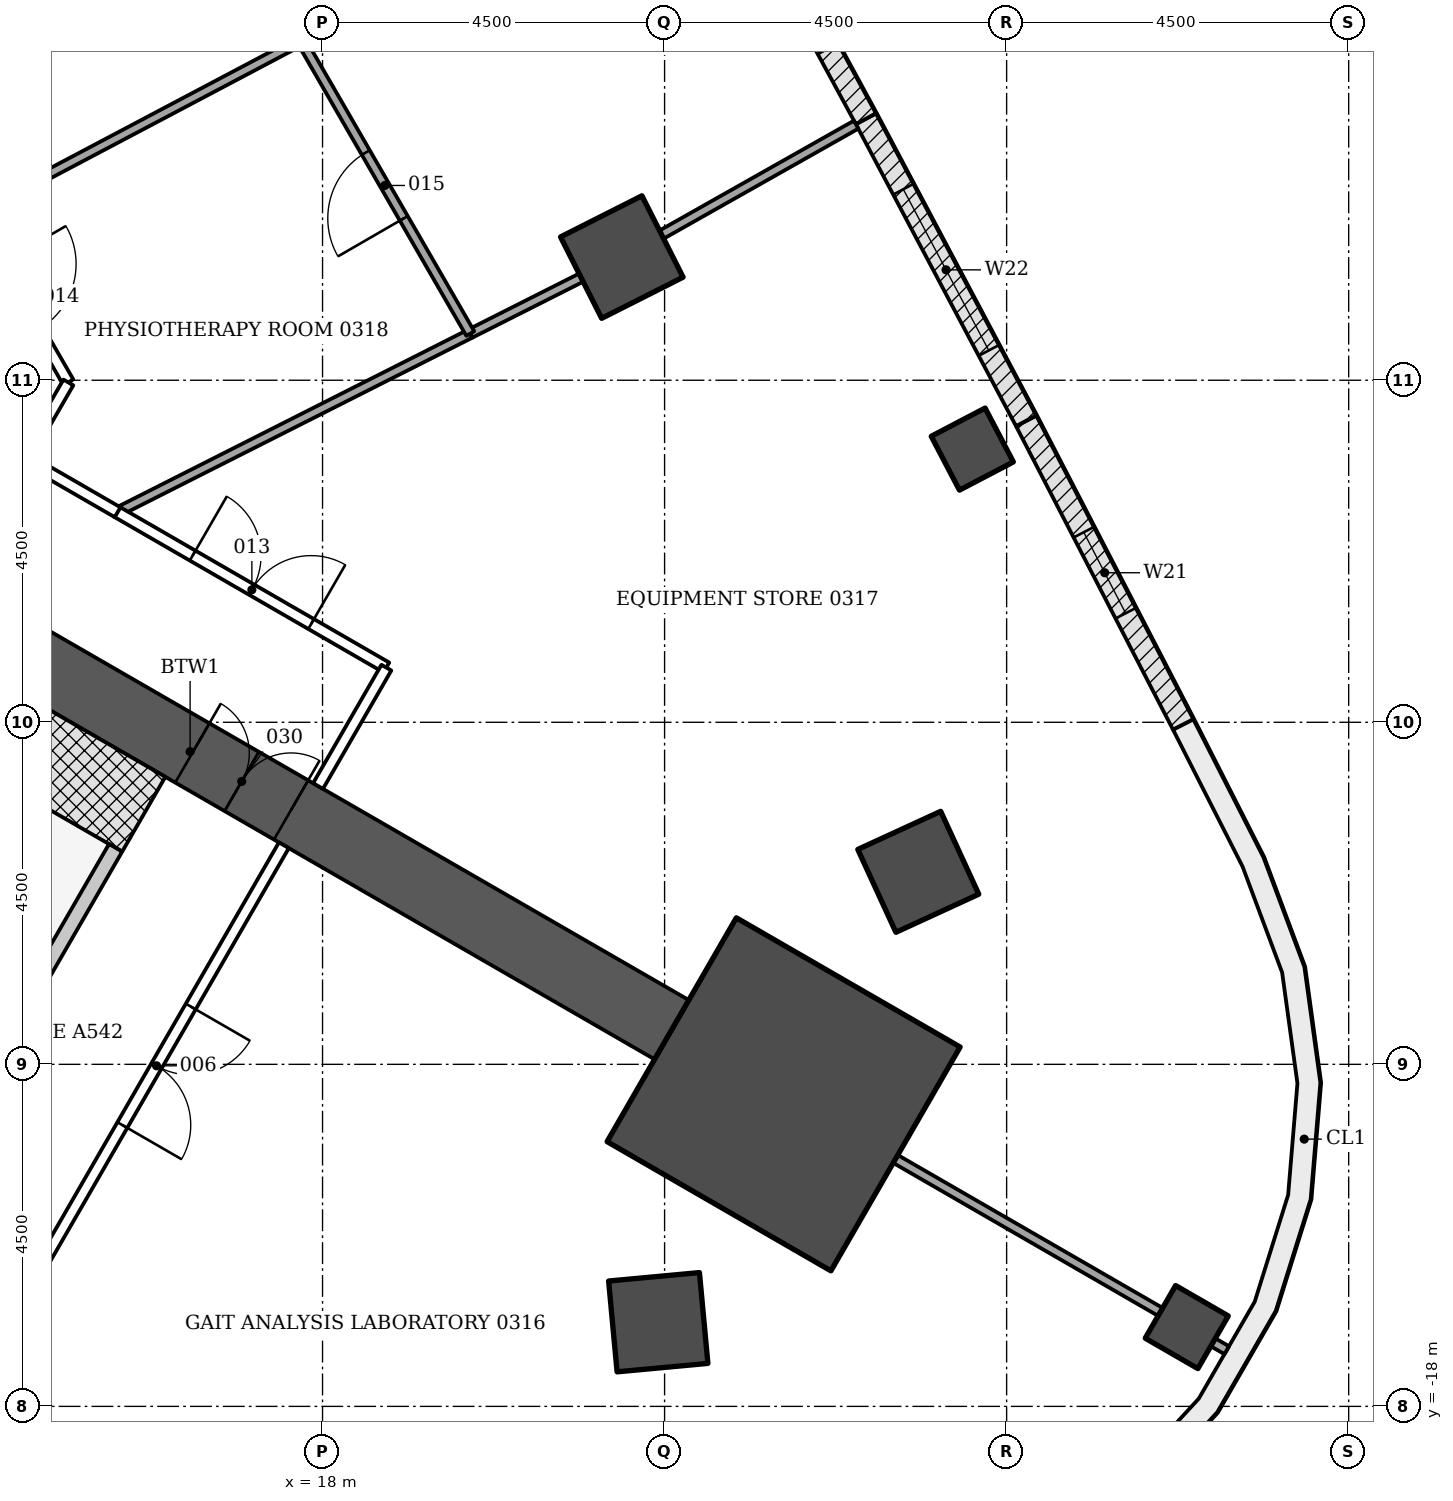
"""IFC4 building model, lengths in metres.
Left out: names, types, materials, properties, quantities, classifications, styles, units other than length and angle.
Written with IfcOpenShell. Run it as: python <this file> out.ifc"""

import sys

from ifc_helpers import new_model, si_unit, direction, frame, frame_2d, origin, origin_2d, place, context, subcontext, project, spatial, polyline, rectangle, outline, extrude, element, fill, save


model = new_model("IFC4")
c1 = context("Model", 3, precision=1e-05, world=origin(), true_north=direction((0.0, 1.0)))
c2 = subcontext(c1, "Body", "Model", "MODEL_VIEW")
j1 = project(units=[si_unit("LENGTHUNIT", "METRE"), si_unit("PLANEANGLEUNIT", "RADIAN")], contexts=[c1])
p1 = place(None, origin())
s1 = spatial("IfcSite", under=j1, at=p1, CompositionType="ELEMENT")
p2 = place(p1, origin())
s2 = spatial("IfcBuilding", under=s1, at=p2, CompositionType="ELEMENT")
p3 = place(p2, frame((0.0, 0.0, 15.0)))
s3 = spatial("IfcBuildingStorey", under=s2, at=p3, CompositionType="ELEMENT", Elevation=15.0)
for number, where, z_axis, x_axis in (
    (1, (22.417, -16.893, -0.25), (0.0, 0.0, 1.0), (0.093, -0.996, 0.0)),
    (2, (25.838, -10.967, -0.25), (0.0, 0.0, 1.0), (0.909, 0.418, 0.0)),
    (3, (21.937, -2.88, -0.25), (0.0, 0.0, 1.0), (0.893, 0.451, 0.0)),
):
    element("IfcColumn", number, at=place(p3, frame(where, z_axis=z_axis, x_axis=x_axis)), inside=s3, PredefinedType="COLUMN", context=c2, shape_type="SweptSolid", body=[
        extrude(rectangle(XDim=1.2, YDim=1.2, at=origin_2d()), origin(), (0.0, 0.0, 1.0), 4.5),
    ])
for number, where, z_axis, x_axis in (
    (4, (29.37, -16.957, -0.25), (0.0, 0.0, 1.0), (0.866, -0.5, 0.0)),
    (5, (26.548, -5.406, -0.25), (0.0, 0.0, 1.0), (0.886, 0.464, 0.0)),
):
    element("IfcColumn", number, at=place(p3, frame(where, z_axis=z_axis, x_axis=x_axis)), inside=s3, PredefinedType="COLUMN", context=c2, shape_type="SweptSolid", body=[
        extrude(rectangle(XDim=0.8, YDim=0.8, at=origin_2d()), origin(), (0.0, 0.0, 1.0), 4.5),
    ])
p4 = place(p3, frame((9.922, -5.728, -0.25), z_axis=(0.0, 0.0, 1.0), x_axis=(0.866028046028, -0.499995423472, 0.0)))
e6 = element("IfcWall", 6, at=p4, inside=s3, PredefinedType="SHEAR", context=c2, shape_type="SweptSolid", body=[
    extrude(rectangle(XDim=14.633, YDim=0.9, at=frame_2d((7.316, 0.0))), origin(), (0.0, 0.0, 1.0), 4.5),
])
p5 = place(p4, frame((7.35, 0.0, 0.25)))
e7 = element("IfcOpeningElement", 7, at=p5, cuts=e6, PredefinedType="OPENING", context=c2, shape_type="SweptSolid", body=[
    extrude(rectangle(XDim=1.5, YDim=2.1, at=frame_2d((0.75, 1.05))), frame((0.0, 0.46, 0.0), z_axis=(0.0, -1.0, 0.0), x_axis=(1.0, 0.0, 0.0)), (0.0, 0.0, 1.0), 0.92),
])
p6 = place(p3, frame((24.066, -13.895, -0.25), z_axis=(0.0, 0.0, 1.0), x_axis=(0.866025403784, -0.5, 0.0)))
e8 = element("IfcColumn", 8, at=p6, inside=s3, PredefinedType="COLUMN", context=c2, shape_type="SweptSolid", body=[
    extrude(rectangle(XDim=3.4, YDim=3.4, at=origin_2d()), origin(), (0.0, 0.0, 1.0), 4.5),
])
p7 = place(p3, frame((27.258, -5.036, 0.0), z_axis=(0.0, 0.0, 1.0), x_axis=(0.459443600121, -0.888206945654, 0.0)))
e9 = element("IfcWall", 9, at=p7, inside=s3, PredefinedType="NOTDEFINED", context=c2, shape_type="SweptSolid", body=[
    extrude(rectangle(XDim=4.496, YDim=0.3, at=frame_2d((2.248, 0.0))), origin(), (0.0, 0.0, 1.0), 4.25),
])
p8 = place(p7, frame((1.648, 0.0, 0.8)))
e10 = element("IfcOpeningElement", 10, at=p8, cuts=e9, PredefinedType="OPENING", context=c2, shape_type="SweptSolid", body=[
    extrude(rectangle(XDim=1.2, YDim=3.0, at=frame_2d((0.6, 1.5))), frame((0.0, 0.16, 0.0), z_axis=(0.0, -1.0, 0.0), x_axis=(1.0, 0.0, 0.0)), (0.0, 0.0, 1.0), 0.32),
])
p9 = place(p3, frame((25.15, -1.062, 0.0), z_axis=(0.0, 0.0, 1.0), x_axis=(0.468566202388, -0.883428386447, 0.0)))
e11 = element("IfcWall", 11, at=p9, inside=s3, PredefinedType="NOTDEFINED", context=c2, shape_type="SweptSolid", body=[
    extrude(rectangle(XDim=4.496, YDim=0.3, at=frame_2d((2.248, 0.0))), origin(), (0.0, 0.0, 1.0), 4.25),
])
p10 = place(p9, frame((1.048, 0.0, 0.9)))
e12 = element("IfcOpeningElement", 12, at=p10, cuts=e11, PredefinedType="OPENING", context=c2, shape_type="SweptSolid", body=[
    extrude(rectangle(XDim=2.4, YDim=2.4, at=frame_2d((1.2, 1.2))), frame((0.0, 0.16, 0.0), z_axis=(0.0, -1.0, 0.0), x_axis=(1.0, 0.0, 0.0)), (0.0, 0.0, 1.0), 0.32),
])
p11 = place(p3, frame((23.001, 2.89, 0.0), z_axis=(0.0, 0.0, 1.0), x_axis=(0.477577109439, -0.878589838628, 0.0)))
e13 = element("IfcWall", 13, at=p11, inside=s3, PredefinedType="NOTDEFINED", context=c2, shape_type="SweptSolid", body=[
    extrude(rectangle(XDim=4.496, YDim=0.3, at=frame_2d((2.248, 0.0))), origin(), (0.0, 0.0, 1.0), 4.25),
])
p12 = place(p11, frame((1.048, 0.0, 0.9)))
e14 = element("IfcOpeningElement", 14, at=p12, cuts=e13, PredefinedType="OPENING", context=c2, shape_type="SweptSolid", body=[
    extrude(rectangle(XDim=2.4, YDim=2.4, at=frame_2d((1.2, 1.2))), frame((0.0, 0.16, 0.0), z_axis=(0.0, -1.0, 0.0), x_axis=(1.0, 0.0, 0.0)), (0.0, 0.0, 1.0), 0.32),
])
p13 = place(p3, origin())
e15 = element("IfcWall", 15, at=p13, inside=s3, PredefinedType="NOTDEFINED", context=c2, shape_type="SweptSolid", body=[
    extrude(outline(polyline([(22.49, -21.03), (24.522, -20.921), (26.04, -20.666), (27.465, -20.086), (28.729, -19.209), (29.771, -18.077), (30.54, -16.744), (31.0, -15.276), (31.128, -13.742), (30.917, -12.218), (30.379, -10.776), (29.457, -8.962), (29.19, -9.098), (30.104, -10.897), (30.625, -12.292), (30.826, -13.75), (30.704, -15.218), (30.264, -16.623), (29.528, -17.898), (28.531, -18.981), (27.321, -19.821), (25.957, -20.376), (24.489, -20.622), (22.474, -20.73), (22.49, -21.03)])), origin(), (0.0, 0.0, 1.0), 4.25),
])
p14 = place(p3, frame((9.413, -6.61, -0.25), z_axis=(0.0, 0.0, 1.0), x_axis=(0.866018442252, -0.500012057535, 0.0)))
e16 = element("IfcWall", 16, at=p14, inside=s3, PredefinedType="SHEAR", context=c2, shape_type="SweptSolid", body=[
    extrude(rectangle(XDim=7.2, YDim=1.136, at=frame_2d((3.6, 0.0))), origin(), (0.0, 0.0, 1.0), 4.5),
])
p15 = place(p3, frame((0.0, 0.0, -0.25)))
e17 = element("IfcWall", 17, at=p15, inside=s3, PredefinedType="SHEAR", context=c2, shape_type="SweptSolid", body=[
    extrude(outline(polyline([(12.104, -13.149), (14.289, -12.563), (15.364, -10.701), (15.191, -10.601), (14.157, -12.392), (12.132, -12.934), (12.204, -12.976), (12.204, -12.976), (12.204, -12.976), (12.204, -12.976), (12.204, -12.976), (12.204, -12.976), (12.204, -12.976), (12.204, -12.976), (12.204, -12.976), (12.204, -12.976), (12.204, -12.976), (12.204, -12.976), (12.204, -12.976), (12.204, -12.976), (12.204, -12.976), (12.204, -12.976), (12.204, -12.976), (12.104, -13.149)])), origin(), (0.0, 0.0, 1.0), 4.5),
])
p16 = place(p3, frame((17.491, -10.618, 0.0), z_axis=(0.0, 0.0, 1.0), x_axis=(-0.499969057507, -0.866043267704, 0.0)))
e18 = element("IfcWall", 18, at=p16, inside=s3, PredefinedType="PARTITIONING", context=c2, shape_type="SweptSolid", body=[
    extrude(rectangle(XDim=6.685, YDim=0.15, at=frame_2d((3.342, 0.0))), origin(), (0.0, 0.0, 1.0), 3.638),
])
p17 = place(p16, frame((2.45, 0.0, 0.0)))
e19 = element("IfcOpeningElement", 19, at=p17, cuts=e18, PredefinedType="OPENING", context=c2, shape_type="SweptSolid", body=[
    extrude(rectangle(XDim=1.8, YDim=2.1, at=frame_2d((0.9, 1.05))), frame((0.0, 0.085, 0.0), z_axis=(0.0, -1.0, 0.0), x_axis=(1.0, 0.0, 0.0)), (0.0, 0.0, 1.0), 0.17),
])
p18 = place(p3, frame((29.023, -16.757, 0.0), z_axis=(0.0, 0.0, 1.0), x_axis=(-0.866027971625, 0.499995552344, 0.0)))
e20 = element("IfcWall", 20, at=p18, inside=s3, PredefinedType="PARTITIONING", context=c2, shape_type="SweptSolid", body=[
    extrude(rectangle(XDim=4.024, YDim=0.12, at=frame_2d((2.012, 0.0))), origin(), (0.0, 0.0, 1.0), 3.717),
])
p19 = place(p3, frame((29.896, -17.261, 0.0), z_axis=(0.0, 0.0, 1.0), x_axis=(-0.865774595023, 0.500434162116, 0.0)))
e21 = element("IfcWall", 21, at=p19, inside=s3, PredefinedType="PARTITIONING", context=c2, shape_type="SweptSolid", body=[
    extrude(rectangle(XDim=0.208, YDim=0.12, at=frame_2d((0.104, 0.0))), origin(), (0.0, 0.0, 1.0), 4.25),
])
p20 = place(p3, frame((19.942, -3.888, 0.0), z_axis=(0.0, 0.0, 1.0), x_axis=(-0.89243804137, -0.451169970539, 0.0)))
e22 = element("IfcWall", 22, at=p20, inside=s3, PredefinedType="PARTITIONING", context=c2, shape_type="SweptSolid", body=[
    extrude(rectangle(XDim=5.202, YDim=0.12, at=frame_2d((2.601, 0.0))), origin(), (0.0, 0.0, 1.0), 3.638),
])
p21 = place(p3, frame((21.401, -3.151, 0.0), z_axis=(0.0, 0.0, 1.0), x_axis=(-0.892653768212, -0.450742997834, 0.0)))
e23 = element("IfcWall", 23, at=p21, inside=s3, PredefinedType="PARTITIONING", context=c2, shape_type="SweptSolid", body=[
    extrude(rectangle(XDim=1.631, YDim=0.12, at=frame_2d((0.815, 0.0))), origin(), (0.0, 0.0, 1.0), 3.638),
])
p22 = place(p3, frame((25.02, -1.138, 0.0), z_axis=(0.0, 0.0, 1.0), x_axis=(-0.870620069476, -0.491955988505, 0.0)))
e24 = element("IfcWall", 24, at=p22, inside=s3, PredefinedType="PARTITIONING", context=c2, shape_type="SweptSolid", body=[
    extrude(rectangle(XDim=2.939, YDim=0.12, at=frame_2d((1.47, 0.0))), origin(), (0.0, 0.0, 1.0), 3.633),
])
p23 = place(p3, frame((15.295, -6.232, 0.0), z_axis=(0.0, 0.0, 1.0), x_axis=(0.865991915229, -0.500057999394, 0.0)))
e25 = element("IfcWall", 25, at=p23, inside=s3, PredefinedType="PARTITIONING", context=c2, shape_type="SweptSolid", body=[
    extrude(rectangle(XDim=4.094, YDim=0.15, at=frame_2d((2.047, 0.0))), origin(), (0.0, 0.0, 1.0), 3.638),
])
p24 = place(p23, frame((1.15, 0.0, 0.0)))
e26 = element("IfcOpeningElement", 26, at=p24, cuts=e25, PredefinedType="OPENING", context=c2, shape_type="SweptSolid", body=[
    extrude(rectangle(XDim=1.8, YDim=2.1, at=frame_2d((0.9, 1.05))), frame((0.0, 0.085, 0.0), z_axis=(0.0, -1.0, 0.0), x_axis=(1.0, 0.0, 0.0)), (0.0, 0.0, 1.0), 0.17),
])
p25 = place(p3, frame((18.84, -8.281, 0.0), z_axis=(0.0, 0.0, 1.0), x_axis=(-0.500126010714, -0.86595263924, 0.0)))
e27 = element("IfcWall", 27, at=p25, inside=s3, PredefinedType="PARTITIONING", context=c2, shape_type="SweptSolid", body=[
    extrude(rectangle(XDim=1.798, YDim=0.15, at=frame_2d((0.899, 0.0))), origin(), (0.0, 0.0, 1.0), 3.638),
])
p26 = place(p3, frame((19.944, -3.886, 0.0), z_axis=(0.0, 0.0, 1.0), x_axis=(-0.500092923031, 0.865971748, 0.0)))
e28 = element("IfcWall", 28, at=p26, inside=s3, PredefinedType="PARTITIONING", context=c2, shape_type="SweptSolid", body=[
    extrude(rectangle(XDim=4.449, YDim=0.12, at=frame_2d((2.225, 0.0))), origin(), (0.0, 0.0, 1.0), 3.638),
])
p27 = place(p26, frame((1.75, 0.0, 0.0)))
e29 = element("IfcOpeningElement", 29, at=p27, cuts=e28, PredefinedType="OPENING", context=c2, shape_type="SweptSolid", body=[
    extrude(rectangle(XDim=1.0, YDim=2.1, at=frame_2d((0.5, 1.05))), frame((0.0, 0.07, 0.0), z_axis=(0.0, -1.0, 0.0), x_axis=(1.0, 0.0, 0.0)), (0.0, 0.0, 1.0), 0.14),
])
p28 = place(p3, frame((17.717, -0.034, 0.0), z_axis=(0.0, 0.0, 1.0), x_axis=(-0.884117284138, -0.467265051003, 0.0)))
e30 = element("IfcWall", 30, at=p28, inside=s3, PredefinedType="PARTITIONING", context=c2, shape_type="SweptSolid", body=[
    extrude(rectangle(XDim=4.901, YDim=0.12, at=frame_2d((2.45, 0.0))), origin(), (0.0, 0.0, 1.0), 3.638),
])
p29 = place(p3, frame((13.383, -2.321, 0.0), z_axis=(0.0, 0.0, 1.0), x_axis=(0.499788837842, -0.866147283993, 0.0)))
e31 = element("IfcWall", 31, at=p29, inside=s3, PredefinedType="PARTITIONING", context=c2, shape_type="SweptSolid", body=[
    extrude(rectangle(XDim=2.547, YDim=0.15, at=frame_2d((1.273, 0.0))), origin(), (0.0, 0.0, 1.0), 3.638),
])
p30 = place(p29, frame((0.75, 0.0, 0.0)))
e32 = element("IfcOpeningElement", 32, at=p30, cuts=e31, PredefinedType="OPENING", context=c2, shape_type="SweptSolid", body=[
    extrude(rectangle(XDim=1.0, YDim=2.1, at=frame_2d((0.5, 1.05))), frame((0.0, 0.085, 0.0), z_axis=(0.0, -1.0, 0.0), x_axis=(1.0, 0.0, 0.0)), (0.0, 0.0, 1.0), 0.17),
])
p31 = place(p3, frame((14.656, -4.529, 0.0), z_axis=(0.0, 0.0, 1.0), x_axis=(-0.500502949238, -0.865734831114, 0.0)))
e33 = element("IfcWall", 33, at=p31, inside=s3, PredefinedType="PARTITIONING", context=c2, shape_type="SweptSolid", body=[
    extrude(rectangle(XDim=1.155, YDim=0.15, at=frame_2d((0.578, 0.0))), origin(), (0.0, 0.0, 1.0), 4.25),
])
p32 = place(p3, frame((14.078, -5.529, 0.0), z_axis=(0.0, 0.0, 1.0), x_axis=(0.865984561414, -0.500070734389, 0.0)))
e34 = element("IfcWall", 34, at=p32, inside=s3, PredefinedType="PARTITIONING", context=c2, shape_type="SweptSolid", body=[
    extrude(rectangle(XDim=1.416, YDim=0.15, at=frame_2d((0.708, 0.0))), origin(), (0.0, 0.0, 1.0), 3.638),
])
p33 = place(p8, origin())
e35 = element("IfcWindow", 35, at=p33, inside=s3, PartitioningType="SINGLE_PANEL", PredefinedType="WINDOW", context=c2, shape_type="SweptSolid", body=[
    extrude(rectangle(XDim=1.2, YDim=3.0, at=frame_2d((0.6, 1.5))), frame((0.0, 0.03, 0.0), z_axis=(0.0, -1.0, 0.0), x_axis=(1.0, 0.0, 0.0)), (0.0, 0.0, 1.0), 0.06),
])
fill(e10, e35)
p34 = place(p10, origin())
e36 = element("IfcWindow", 36, at=p34, inside=s3, PartitioningType="DOUBLE_PANEL_VERTICAL", PredefinedType="WINDOW", context=c2, shape_type="SweptSolid", body=[
    extrude(rectangle(XDim=2.4, YDim=2.4, at=frame_2d((1.2, 1.2))), frame((0.0, 0.03, 0.0), z_axis=(0.0, -1.0, 0.0), x_axis=(1.0, 0.0, 0.0)), (0.0, 0.0, 1.0), 0.06),
])
fill(e12, e36)
p35 = place(p17, origin())
e37 = element("IfcDoor", 37, at=p35, inside=s3, OperationType="DOUBLE_DOOR_SINGLE_SWING", PredefinedType="DOOR", context=c2, shape_type="SweptSolid", body=[
    extrude(rectangle(XDim=1.8, YDim=2.1, at=frame_2d((0.9, 1.05))), frame((0.0, 0.025, 0.0), z_axis=(0.0, -1.0, 0.0), x_axis=(1.0, 0.0, 0.0)), (0.0, 0.0, 1.0), 0.05),
])
fill(e19, e37)
p36 = place(p24, origin())
e38 = element("IfcDoor", 38, at=p36, inside=s3, OperationType="DOUBLE_DOOR_SINGLE_SWING", PredefinedType="DOOR", context=c2, shape_type="SweptSolid", body=[
    extrude(rectangle(XDim=1.8, YDim=2.1, at=frame_2d((0.9, 1.05))), frame((0.0, 0.025, 0.0), z_axis=(0.0, -1.0, 0.0), x_axis=(1.0, 0.0, 0.0)), (0.0, 0.0, 1.0), 0.05),
])
fill(e26, e38)
p37 = place(p27, origin())
e39 = element("IfcDoor", 39, at=p37, inside=s3, OperationType="SINGLE_SWING_LEFT", PredefinedType="DOOR", context=c2, shape_type="SweptSolid", body=[
    extrude(rectangle(XDim=1.0, YDim=2.1, at=frame_2d((0.5, 1.05))), frame((0.0, 0.025, 0.0), z_axis=(0.0, -1.0, 0.0), x_axis=(1.0, 0.0, 0.0)), (0.0, 0.0, 1.0), 0.05),
])
fill(e29, e39)
p38 = place(p5, origin())
e40 = element("IfcDoor", 40, at=p38, inside=s3, OperationType="DOUBLE_DOOR_SINGLE_SWING", PredefinedType="DOOR", context=c2, shape_type="SweptSolid", body=[
    extrude(rectangle(XDim=1.5, YDim=2.1, at=frame_2d((0.75, 1.05))), frame((0.0, 0.025, 0.0), z_axis=(0.0, -1.0, 0.0), x_axis=(1.0, 0.0, 0.0)), (0.0, 0.0, 1.0), 0.05),
])
fill(e7, e40)
save(model, sys.argv[1])
